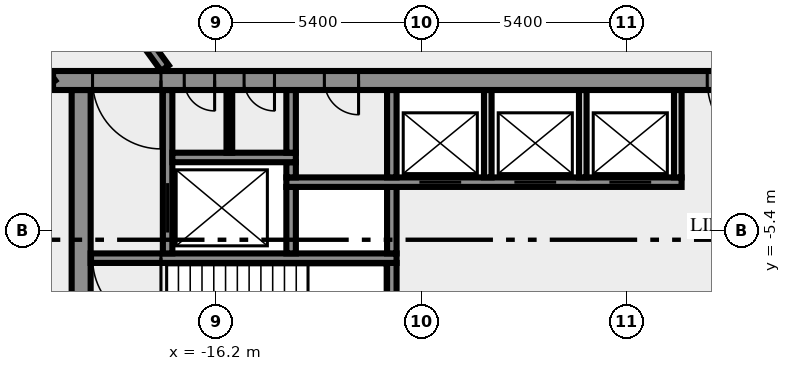
"""IFC4 building model, lengths in metres.
Left out: names, types, materials, properties, quantities, classifications, styles, units other than length and angle.
Written with IfcOpenShell. Run it as: python <this file> out.ifc"""

import sys

from ifc_helpers import new_model, si_unit, direction, frame, frame_2d, origin, place, context, subcontext, project, spatial, rectangle, extrude, element, fill, save


model = new_model("IFC4")
c1 = context("Model", 3, precision=1e-05, world=origin(), true_north=direction((0.0, 1.0)))
c2 = subcontext(c1, "Body", "Model", "MODEL_VIEW")
j1 = project(units=[si_unit("LENGTHUNIT", "METRE"), si_unit("PLANEANGLEUNIT", "RADIAN")], contexts=[c1])
p1 = place(None, origin())
s1 = spatial("IfcSite", under=j1, at=p1, CompositionType="ELEMENT")
p2 = place(p1, origin())
s2 = spatial("IfcBuilding", under=s1, at=p2, CompositionType="ELEMENT")
p3 = place(p2, frame((0.0, 0.0, 113.0)))
s3 = spatial("IfcBuildingStorey", under=s2, at=p3, CompositionType="ELEMENT", Elevation=113.0)
p4 = place(p3, frame((-19.75, -10.5, 0.0), z_axis=(0.0, 0.0, 1.0), x_axis=(0.0, 1.0, 0.0)))
e1 = element("IfcWall", 1, at=p4, inside=s3, PredefinedType="SHEAR", context=c2, shape_type="SweptSolid", body=[
    extrude(rectangle(XDim=8.8, YDim=0.5, at=frame_2d((4.4, 0.0))), origin(), (0.0, 0.0, 1.0), 3.65),
])
p5 = place(p3, frame((-11.575, -7.25, 0.0), z_axis=(0.0, 0.0, 1.0), x_axis=(0.0, 1.0, 0.0)))
e2 = element("IfcWall", 2, at=p5, inside=s3, PredefinedType="SHEAR", context=c2, shape_type="SweptSolid", body=[
    extrude(rectangle(XDim=1.0, YDim=0.25, at=frame_2d((0.5, 0.0))), origin(), (0.0, 0.0, 1.0), 3.65),
])
p6 = place(p3, frame((-11.45, -6.125, 0.0), z_axis=(0.0, 0.0, 1.0), x_axis=(-1.0, 0.0, 0.0)))
e3 = element("IfcWall", 3, at=p6, inside=s3, PredefinedType="SHEAR", context=c2, shape_type="SweptSolid", body=[
    extrude(rectangle(XDim=8.05, YDim=0.25, at=frame_2d((4.025, 0.0))), origin(), (0.0, 0.0, 1.0), 3.65),
])
p7 = place(p6, frame((6.2, 0.0, 0.0)))
e4 = element("IfcOpeningElement", 4, at=p7, cuts=e3, PredefinedType="OPENING", context=c2, shape_type="SweptSolid", body=[
    extrude(rectangle(XDim=1.8, YDim=2.1, at=frame_2d((0.9, 1.05))), frame((0.0, 0.135, 0.0), z_axis=(0.0, -1.0, 0.0), x_axis=(1.0, 0.0, 0.0)), (0.0, 0.0, 1.0), 0.27),
])
p8 = place(p3, frame((-17.475, -6.0, 0.0), z_axis=(0.0, 0.0, 1.0), x_axis=(0.0, 1.0, 0.0)))
e5 = element("IfcWall", 5, at=p8, inside=s3, PredefinedType="SHEAR", context=c2, shape_type="SweptSolid", body=[
    extrude(rectangle(XDim=4.3, YDim=0.25, at=frame_2d((2.15, 0.0))), origin(), (0.0, 0.0, 1.0), 3.65),
])
p9 = place(p8, frame((0.55, 0.0, 0.0)))
e6 = element("IfcOpeningElement", 6, at=p9, cuts=e5, PredefinedType="OPENING", context=c2, shape_type="SweptSolid", body=[
    extrude(rectangle(XDim=1.3, YDim=2.1, at=frame_2d((0.65, 1.05))), frame((0.0, 0.135, 0.0), z_axis=(0.0, -1.0, 0.0), x_axis=(1.0, 0.0, 0.0)), (0.0, 0.0, 1.0), 0.27),
])
for number, where, z_axis, x_axis in (
    (7, (-14.225, -6.0, 0.0), (0.0, 0.0, 1.0), (0.0, 1.0, 0.0)),
    (8, (-11.575, -6.0, 0.0), (0.0, 0.0, 1.0), (0.0, 1.0, 0.0)),
):
    element("IfcWall", number, at=place(p3, frame(where, z_axis=z_axis, x_axis=x_axis)), inside=s3, PredefinedType="SHEAR", context=c2, shape_type="SweptSolid", body=[
        extrude(rectangle(XDim=1.75, YDim=0.25, at=frame_2d((0.875, 0.0))), origin(), (0.0, 0.0, 1.0), 3.65),
    ])
p10 = place(p3, frame((-14.35, -4.125, 0.0), z_axis=(0.0, 0.0, 1.0), x_axis=(1.0, 0.0, 0.0)))
e9 = element("IfcWall", 9, at=p10, inside=s3, PredefinedType="SHEAR", context=c2, shape_type="SweptSolid", body=[
    extrude(rectangle(XDim=10.4, YDim=0.25, at=frame_2d((5.2, 0.0))), origin(), (0.0, 0.0, 1.0), 3.65),
])
p11 = place(p10, frame((3.5, 0.0, 0.0)))
e10 = element("IfcOpeningElement", 10, at=p11, cuts=e9, PredefinedType="OPENING", context=c2, shape_type="SweptSolid", body=[
    extrude(rectangle(XDim=1.1, YDim=2.1, at=frame_2d((0.55, 1.05))), frame((0.0, 0.135, 0.0), z_axis=(0.0, -1.0, 0.0), x_axis=(1.0, 0.0, 0.0)), (0.0, 0.0, 1.0), 0.27),
])
p12 = place(p10, frame((6.0, 0.0, 0.0)))
e11 = element("IfcOpeningElement", 11, at=p12, cuts=e9, PredefinedType="OPENING", context=c2, shape_type="SweptSolid", body=[
    extrude(rectangle(XDim=1.1, YDim=2.1, at=frame_2d((0.55, 1.05))), frame((0.0, 0.135, 0.0), z_axis=(0.0, -1.0, 0.0), x_axis=(1.0, 0.0, 0.0)), (0.0, 0.0, 1.0), 0.27),
])
p13 = place(p10, frame((8.5, 0.0, 0.0)))
e12 = element("IfcOpeningElement", 12, at=p13, cuts=e9, PredefinedType="OPENING", context=c2, shape_type="SweptSolid", body=[
    extrude(rectangle(XDim=1.1, YDim=2.1, at=frame_2d((0.55, 1.05))), frame((0.0, 0.135, 0.0), z_axis=(0.0, -1.0, 0.0), x_axis=(1.0, 0.0, 0.0)), (0.0, 0.0, 1.0), 0.27),
])
p14 = place(p3, frame((-14.225, -4.0, 0.0), z_axis=(0.0, 0.0, 1.0), x_axis=(0.0, 1.0, 0.0)))
e13 = element("IfcWall", 13, at=p14, inside=s3, PredefinedType="SHEAR", context=c2, shape_type="SweptSolid", body=[
    extrude(rectangle(XDim=0.4, YDim=0.25, at=frame_2d((0.2, 0.0))), origin(), (0.0, 0.0, 1.0), 3.65),
])
p15 = place(p3, frame((-11.575, -4.0, 0.0), z_axis=(0.0, 0.0, 1.0), x_axis=(0.0, 1.0, 0.0)))
e14 = element("IfcWall", 14, at=p15, inside=s3, PredefinedType="SHEAR", context=c2, shape_type="SweptSolid", body=[
    extrude(rectangle(XDim=2.3, YDim=0.25, at=frame_2d((1.15, 0.0))), origin(), (0.0, 0.0, 1.0), 3.65),
])
for number, where, z_axis, x_axis in (
    (15, (-9.05, -4.0, 0.0), (0.0, 0.0, 1.0), (0.0, 1.0, 0.0)),
    (16, (-6.55, -4.0, 0.0), (0.0, 0.0, 1.0), (0.0, 1.0, 0.0)),
    (17, (-4.05, -4.0, 0.0), (0.0, 0.0, 1.0), (0.0, 1.0, 0.0)),
):
    element("IfcWall", number, at=place(p3, frame(where, z_axis=z_axis, x_axis=x_axis)), inside=s3, PredefinedType="SOLIDWALL", context=c2, shape_type="SweptSolid", body=[
        extrude(rectangle(XDim=2.3, YDim=0.2, at=frame_2d((1.15, 0.0))), origin(), (0.0, 0.0, 1.0), 3.65),
    ])
p16 = place(p3, frame((-17.35, -3.475, 0.0), z_axis=(0.0, 0.0, 1.0), x_axis=(1.0, 0.0, 0.0)))
e18 = element("IfcWall", 18, at=p16, inside=s3, PredefinedType="SHEAR", context=c2, shape_type="SweptSolid", body=[
    extrude(rectangle(XDim=3.25, YDim=0.25, at=frame_2d((1.625, 0.0))), origin(), (0.0, 0.0, 1.0), 3.65),
])
p17 = place(p3, frame((-15.85, -3.35, 0.0), z_axis=(0.0, 0.0, 1.0), x_axis=(0.0, 1.0, 0.0)))
e19 = element("IfcWall", 19, at=p17, inside=s3, PredefinedType="PARTITIONING", context=c2, shape_type="SweptSolid", body=[
    extrude(rectangle(XDim=1.65, YDim=0.15, at=frame_2d((0.825, 0.0))), origin(), (0.0, 0.0, 1.0), 3.65),
])
p18 = place(p3, frame((-14.225, -3.35, 0.0), z_axis=(0.0, 0.0, 1.0), x_axis=(0.0, 1.0, 0.0)))
e20 = element("IfcWall", 20, at=p18, inside=s3, PredefinedType="SHEAR", context=c2, shape_type="SweptSolid", body=[
    extrude(rectangle(XDim=1.65, YDim=0.25, at=frame_2d((0.825, 0.0))), origin(), (0.0, 0.0, 1.0), 3.65),
])
p19 = place(p3, frame((20.49, -1.45, 0.0), z_axis=(0.0, 0.0, 1.0), x_axis=(-1.0, 0.0, 0.0)))
e21 = element("IfcWall", 21, at=p19, inside=s3, PredefinedType="SHEAR", context=c2, shape_type="SweptSolid", body=[
    extrude(rectangle(XDim=40.98, YDim=0.5, at=frame_2d((20.49, 0.0))), origin(), (0.0, 0.0, 1.0), 3.65),
])
p20 = place(p19, frame((38.14, 0.0, 0.0)))
e22 = element("IfcOpeningElement", 22, at=p20, cuts=e21, PredefinedType="OPENING", context=c2, shape_type="SweptSolid", body=[
    extrude(rectangle(XDim=1.8, YDim=2.1, at=frame_2d((0.9, 1.05))), frame((0.0, 0.26, 0.0), z_axis=(0.0, -1.0, 0.0), x_axis=(1.0, 0.0, 0.0)), (0.0, 0.0, 1.0), 0.52),
])
p21 = place(p19, frame((36.728, 0.0, 0.0)))
e23 = element("IfcOpeningElement", 23, at=p21, cuts=e21, PredefinedType="OPENING", context=c2, shape_type="SweptSolid", body=[
    extrude(rectangle(XDim=0.8, YDim=2.1, at=frame_2d((0.4, 1.05))), frame((0.0, 0.26, 0.0), z_axis=(0.0, -1.0, 0.0), x_axis=(1.0, 0.0, 0.0)), (0.0, 0.0, 1.0), 0.52),
])
p22 = place(p19, frame((35.153, 0.0, 0.0)))
e24 = element("IfcOpeningElement", 24, at=p22, cuts=e21, PredefinedType="OPENING", context=c2, shape_type="SweptSolid", body=[
    extrude(rectangle(XDim=0.8, YDim=2.1, at=frame_2d((0.4, 1.05))), frame((0.0, 0.26, 0.0), z_axis=(0.0, -1.0, 0.0), x_axis=(1.0, 0.0, 0.0)), (0.0, 0.0, 1.0), 0.52),
])
p23 = place(p19, frame((32.94, 0.0, 0.0)))
e25 = element("IfcOpeningElement", 25, at=p23, cuts=e21, PredefinedType="OPENING", context=c2, shape_type="SweptSolid", body=[
    extrude(rectangle(XDim=0.9, YDim=2.1, at=frame_2d((0.45, 1.05))), frame((0.0, 0.26, 0.0), z_axis=(0.0, -1.0, 0.0), x_axis=(1.0, 0.0, 0.0)), (0.0, 0.0, 1.0), 0.52),
])
p24 = place(p19, frame((21.765, 0.0, 0.0)))
e26 = element("IfcOpeningElement", 26, at=p24, cuts=e21, PredefinedType="OPENING", context=c2, shape_type="SweptSolid", body=[
    extrude(rectangle(XDim=2.0, YDim=2.1, at=frame_2d((1.0, 1.05))), frame((0.0, 0.26, 0.0), z_axis=(0.0, -1.0, 0.0), x_axis=(1.0, 0.0, 0.0)), (0.0, 0.0, 1.0), 0.52),
])
p25 = place(p19, frame((7.14, 0.0, 0.0)))
e27 = element("IfcOpeningElement", 27, at=p25, cuts=e21, PredefinedType="OPENING", context=c2, shape_type="SweptSolid", body=[
    extrude(rectangle(XDim=0.9, YDim=2.1, at=frame_2d((0.45, 1.05))), frame((0.0, 0.26, 0.0), z_axis=(0.0, -1.0, 0.0), x_axis=(1.0, 0.0, 0.0)), (0.0, 0.0, 1.0), 0.52),
])
p26 = place(p19, frame((4.19, 0.0, 0.0)))
e28 = element("IfcOpeningElement", 28, at=p26, cuts=e21, PredefinedType="OPENING", context=c2, shape_type="SweptSolid", body=[
    extrude(rectangle(XDim=0.9, YDim=2.1, at=frame_2d((0.45, 1.05))), frame((0.0, 0.26, 0.0), z_axis=(0.0, -1.0, 0.0), x_axis=(1.0, 0.0, 0.0)), (0.0, 0.0, 1.0), 0.52),
])
p27 = place(p19, frame((1.04, 0.0, 0.0)))
e29 = element("IfcOpeningElement", 29, at=p27, cuts=e21, PredefinedType="OPENING", context=c2, shape_type="SweptSolid", body=[
    extrude(rectangle(XDim=1.8, YDim=2.1, at=frame_2d((0.9, 1.05))), frame((0.0, 0.26, 0.0), z_axis=(0.0, -1.0, 0.0), x_axis=(1.0, 0.0, 0.0)), (0.0, 0.0, 1.0), 0.52),
])
p28 = place(p3, frame((-20.531, -1.523, 0.0), z_axis=(0.0, 0.0, 1.0), x_axis=(-0.587784522481, 0.809017524614, 0.0)))
e30 = element("IfcWall", 30, at=p28, inside=s3, PredefinedType="SOLIDWALL", context=c2, shape_type="SweptSolid", body=[
    extrude(rectangle(XDim=49.912, YDim=0.25, at=frame_2d((24.956, 0.0))), origin(), (0.0, 0.0, 1.0), 3.65),
])
p29 = place(p28, frame((10.266, 0.0, 0.0)))
e31 = element("IfcOpeningElement", 31, at=p29, cuts=e30, PredefinedType="OPENING", context=c2, shape_type="SweptSolid", body=[
    extrude(rectangle(XDim=0.9, YDim=2.1, at=frame_2d((0.45, 1.05))), frame((0.0, 0.135, 0.0), z_axis=(0.0, -1.0, 0.0), x_axis=(1.0, 0.0, 0.0)), (0.0, 0.0, 1.0), 0.27),
])
p30 = place(p28, frame((32.366, 0.0, 0.0)))
e32 = element("IfcOpeningElement", 32, at=p30, cuts=e30, PredefinedType="OPENING", context=c2, shape_type="SweptSolid", body=[
    extrude(rectangle(XDim=1.8, YDim=2.1, at=frame_2d((0.9, 1.05))), frame((0.0, 0.135, 0.0), z_axis=(0.0, -1.0, 0.0), x_axis=(1.0, 0.0, 0.0)), (0.0, 0.0, 1.0), 0.27),
])
p31 = place(p28, frame((11.815, 0.0, 0.0)))
e33 = element("IfcOpeningElement", 33, at=p31, cuts=e30, PredefinedType="OPENING", context=c2, shape_type="SweptSolid", body=[
    extrude(rectangle(XDim=1.8, YDim=2.1, at=frame_2d((0.9, 1.05))), frame((0.0, 0.135, 0.0), z_axis=(0.0, -1.0, 0.0), x_axis=(1.0, 0.0, 0.0)), (0.0, 0.0, 1.0), 0.27),
])
p32 = place(p28, frame((48.57, 0.0, 0.0)))
e34 = element("IfcOpeningElement", 34, at=p32, cuts=e30, PredefinedType="OPENING", context=c2, shape_type="SweptSolid", body=[
    extrude(rectangle(XDim=0.9, YDim=2.1, at=frame_2d((0.45, 1.05))), frame((0.0, 0.135, 0.0), z_axis=(0.0, -1.0, 0.0), x_axis=(1.0, 0.0, 0.0)), (0.0, 0.0, 1.0), 0.27),
])
p33 = place(p28, frame((35.915, 0.0, 0.0)))
e35 = element("IfcOpeningElement", 35, at=p33, cuts=e30, PredefinedType="OPENING", context=c2, shape_type="SweptSolid", body=[
    extrude(rectangle(XDim=0.9, YDim=2.1, at=frame_2d((0.45, 1.05))), frame((0.0, 0.135, 0.0), z_axis=(0.0, -1.0, 0.0), x_axis=(1.0, 0.0, 0.0)), (0.0, 0.0, 1.0), 0.27),
])
p34 = place(p3, frame((-37.232, 25.972, 0.0), z_axis=(0.0, 0.0, 1.0), x_axis=(0.587786323093, -0.809016216391, 0.0)))
e36 = element("IfcWall", 36, at=p34, inside=s3, PredefinedType="SOLIDWALL", context=c2, shape_type="SweptSolid", body=[
    extrude(rectangle(XDim=33.493, YDim=0.25, at=frame_2d((16.747, 0.0))), origin(), (0.0, 0.0, 1.0), 3.65),
])
p35 = place(p34, frame((5.385, 0.0, 0.0)))
e37 = element("IfcOpeningElement", 37, at=p35, cuts=e36, PredefinedType="OPENING", context=c2, shape_type="SweptSolid", body=[
    extrude(rectangle(XDim=0.9, YDim=2.1, at=frame_2d((0.45, 1.05))), frame((0.0, 0.135, 0.0), z_axis=(0.0, -1.0, 0.0), x_axis=(1.0, 0.0, 0.0)), (0.0, 0.0, 1.0), 0.27),
])
p36 = place(p34, frame((6.985, 0.0, 0.0)))
e38 = element("IfcOpeningElement", 38, at=p36, cuts=e36, PredefinedType="OPENING", context=c2, shape_type="SweptSolid", body=[
    extrude(rectangle(XDim=0.9, YDim=2.1, at=frame_2d((0.45, 1.05))), frame((0.0, 0.135, 0.0), z_axis=(0.0, -1.0, 0.0), x_axis=(1.0, 0.0, 0.0)), (0.0, 0.0, 1.0), 0.27),
])
p37 = place(p7, origin())
e39 = element("IfcDoor", 39, at=p37, inside=s3, OperationType="DOUBLE_DOOR_SINGLE_SWING", PredefinedType="DOOR", context=c2, shape_type="SweptSolid", body=[
    extrude(rectangle(XDim=1.8, YDim=2.1, at=frame_2d((0.9, 1.05))), frame((0.0, 0.025, 0.0), z_axis=(0.0, -1.0, 0.0), x_axis=(1.0, 0.0, 0.0)), (0.0, 0.0, 1.0), 0.05),
])
fill(e4, e39)
p38 = place(p9, origin())
e40 = element("IfcDoor", 40, at=p38, inside=s3, OperationType="DOUBLE_DOOR_SLIDING", PredefinedType="DOOR", context=c2, shape_type="SweptSolid", body=[
    extrude(rectangle(XDim=1.3, YDim=2.1, at=frame_2d((0.65, 1.05))), frame((0.0, 0.025, 0.0), z_axis=(0.0, -1.0, 0.0), x_axis=(1.0, 0.0, 0.0)), (0.0, 0.0, 1.0), 0.05),
])
fill(e6, e40)
p39 = place(p11, origin())
e41 = element("IfcDoor", 41, at=p39, inside=s3, OperationType="DOUBLE_DOOR_SLIDING", PredefinedType="DOOR", context=c2, shape_type="SweptSolid", body=[
    extrude(rectangle(XDim=1.1, YDim=2.1, at=frame_2d((0.55, 1.05))), frame((0.0, 0.025, 0.0), z_axis=(0.0, -1.0, 0.0), x_axis=(1.0, 0.0, 0.0)), (0.0, 0.0, 1.0), 0.05),
])
fill(e10, e41)
p40 = place(p12, origin())
e42 = element("IfcDoor", 42, at=p40, inside=s3, OperationType="DOUBLE_DOOR_SLIDING", PredefinedType="DOOR", context=c2, shape_type="SweptSolid", body=[
    extrude(rectangle(XDim=1.1, YDim=2.1, at=frame_2d((0.55, 1.05))), frame((0.0, 0.025, 0.0), z_axis=(0.0, -1.0, 0.0), x_axis=(1.0, 0.0, 0.0)), (0.0, 0.0, 1.0), 0.05),
])
fill(e11, e42)
p41 = place(p13, origin())
e43 = element("IfcDoor", 43, at=p41, inside=s3, OperationType="DOUBLE_DOOR_SLIDING", PredefinedType="DOOR", context=c2, shape_type="SweptSolid", body=[
    extrude(rectangle(XDim=1.1, YDim=2.1, at=frame_2d((0.55, 1.05))), frame((0.0, 0.025, 0.0), z_axis=(0.0, -1.0, 0.0), x_axis=(1.0, 0.0, 0.0)), (0.0, 0.0, 1.0), 0.05),
])
fill(e12, e43)
p42 = place(p20, origin())
e44 = element("IfcDoor", 44, at=p42, inside=s3, OperationType="DOUBLE_DOOR_SINGLE_SWING", PredefinedType="DOOR", context=c2, shape_type="SweptSolid", body=[
    extrude(rectangle(XDim=1.8, YDim=2.1, at=frame_2d((0.9, 1.05))), frame((0.0, 0.025, 0.0), z_axis=(0.0, -1.0, 0.0), x_axis=(1.0, 0.0, 0.0)), (0.0, 0.0, 1.0), 0.05),
])
fill(e22, e44)
p43 = place(p21, origin())
e45 = element("IfcDoor", 45, at=p43, inside=s3, OperationType="SINGLE_SWING_RIGHT", PredefinedType="DOOR", context=c2, shape_type="SweptSolid", body=[
    extrude(rectangle(XDim=0.8, YDim=2.1, at=frame_2d((0.4, 1.05))), frame((0.0, 0.025, 0.0), z_axis=(0.0, -1.0, 0.0), x_axis=(1.0, 0.0, 0.0)), (0.0, 0.0, 1.0), 0.05),
])
fill(e23, e45)
p44 = place(p22, origin())
e46 = element("IfcDoor", 46, at=p44, inside=s3, OperationType="SINGLE_SWING_RIGHT", PredefinedType="DOOR", context=c2, shape_type="SweptSolid", body=[
    extrude(rectangle(XDim=0.8, YDim=2.1, at=frame_2d((0.4, 1.05))), frame((0.0, 0.025, 0.0), z_axis=(0.0, -1.0, 0.0), x_axis=(1.0, 0.0, 0.0)), (0.0, 0.0, 1.0), 0.05),
])
fill(e24, e46)
p45 = place(p23, origin())
e47 = element("IfcDoor", 47, at=p45, inside=s3, OperationType="SINGLE_SWING_RIGHT", PredefinedType="DOOR", context=c2, shape_type="SweptSolid", body=[
    extrude(rectangle(XDim=0.9, YDim=2.1, at=frame_2d((0.45, 1.05))), frame((0.0, 0.025, 0.0), z_axis=(0.0, -1.0, 0.0), x_axis=(1.0, 0.0, 0.0)), (0.0, 0.0, 1.0), 0.05),
])
fill(e25, e47)
p46 = place(p24, origin())
e48 = element("IfcDoor", 48, at=p46, inside=s3, OperationType="DOUBLE_DOOR_SINGLE_SWING", PredefinedType="DOOR", context=c2, shape_type="SweptSolid", body=[
    extrude(rectangle(XDim=2.0, YDim=2.1, at=frame_2d((1.0, 1.05))), frame((0.0, 0.025, 0.0), z_axis=(0.0, -1.0, 0.0), x_axis=(1.0, 0.0, 0.0)), (0.0, 0.0, 1.0), 0.05),
])
fill(e26, e48)
save(model, sys.argv[1])
